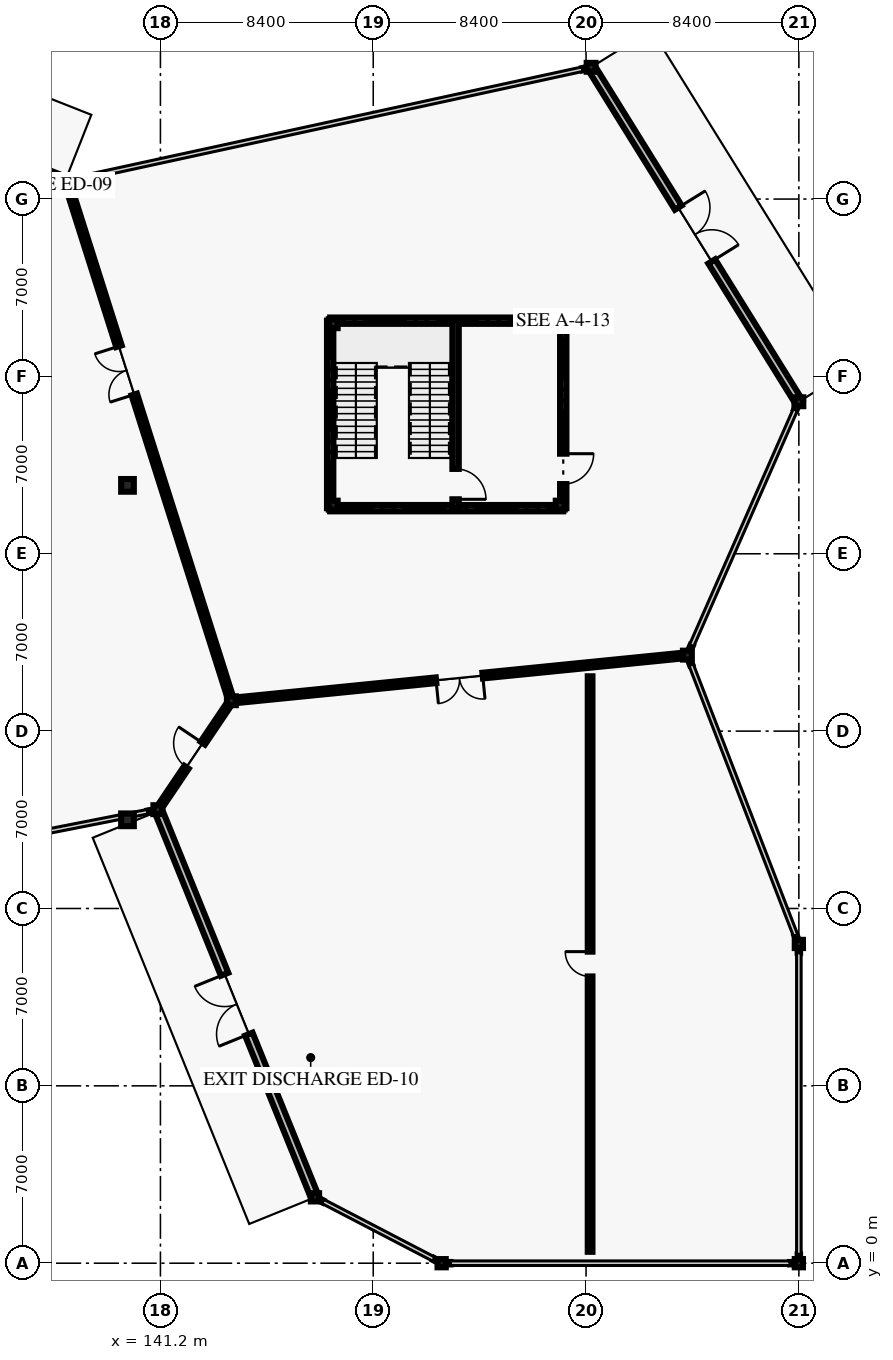
"""IFC4 building model, lengths in metres.
Left out: names, types, materials, properties, quantities, classifications, styles, units other than length and angle.
Written with IfcOpenShell. Run it as: python <this file> out.ifc"""

import sys

from ifc_helpers import new_model, si_unit, direction, frame, frame_2d, origin, origin_2d, place, context, subcontext, project, spatial, rectangle, hollow_circle, i_section, extrude, element, fill, save


model = new_model("IFC4")
c1 = context("Model", 3, precision=1e-05, world=origin(), true_north=direction((0.0, 1.0)))
c2 = subcontext(c1, "Body", "Model", "MODEL_VIEW")
j1 = project(units=[si_unit("LENGTHUNIT", "METRE"), si_unit("PLANEANGLEUNIT", "RADIAN")], contexts=[c1])
p1 = place(None, origin())
s1 = spatial("IfcSite", under=j1, at=p1, CompositionType="ELEMENT")
p2 = place(p1, origin())
s2 = spatial("IfcBuilding", under=s1, at=p2, CompositionType="ELEMENT")
p3 = place(p2, origin())
s3 = spatial("IfcBuildingStorey", under=s2, at=p3, CompositionType="ELEMENT", Elevation=0.0)
for number, where, z_axis, x_axis in (
    (1, (137.5, 42.7, 0.0), (0.0, 0.0, 1.0), (1.0, 0.0, 0.0)),
    (2, (141.1, 17.9, 0.0), (0.0, 0.0, 1.0), (1.0, 0.0, 0.0)),
    (3, (144.0, 22.2, 0.0), (0.0, 0.0, 1.0), (1.0, 0.0, 0.0)),
):
    element("IfcColumn", number, at=place(p3, frame(where, z_axis=z_axis, x_axis=x_axis)), inside=s3, PredefinedType="COLUMN", context=c2, shape_type="SweptSolid", body=[
        extrude(i_section(OverallWidth=0.35, OverallDepth=0.35, WebThickness=0.02, FlangeThickness=0.028, at=origin_2d()), origin(), (0.0, 0.0, 1.0), 5.4),
    ])
for number, where, z_axis, x_axis in (
    (4, (147.3, 2.6, 0.0), (0.0, 0.0, 1.0), (1.0, 0.0, 0.0)),
    (5, (152.3, 0.0, 0.0), (0.0, 0.0, 1.0), (1.0, 0.0, 0.0)),
):
    element("IfcColumn", number, at=place(p3, frame(where, z_axis=z_axis, x_axis=x_axis)), inside=s3, PredefinedType="COLUMN", context=c2, shape_type="SweptSolid", body=[
        extrude(hollow_circle(Radius=0.162, WallThickness=0.01, at=origin_2d()), origin(), (0.0, 0.0, 1.0), 5.4),
    ])
for number, where, z_axis, x_axis in (
    (6, (158.2, 47.2, 0.0), (0.0, 0.0, 1.0), (1.0, 0.0, 0.0)),
    (7, (162.0, 24.0, 0.0), (0.0, 0.0, 1.0), (1.0, 0.0, 0.0)),
):
    element("IfcColumn", number, at=place(p3, frame(where, z_axis=z_axis, x_axis=x_axis)), inside=s3, PredefinedType="COLUMN", context=c2, shape_type="SweptSolid", body=[
        extrude(i_section(OverallWidth=0.35, OverallDepth=0.35, WebThickness=0.02, FlangeThickness=0.028, at=origin_2d()), origin(), (0.0, 0.0, 1.0), 5.4),
    ])
for number, where, z_axis, x_axis in (
    (8, (166.4, 0.0, 0.0), (0.0, 0.0, 1.0), (1.0, 0.0, 0.0)),
    (9, (166.4, 12.6, 0.0), (0.0, 0.0, 1.0), (1.0, 0.0, 0.0)),
):
    element("IfcColumn", number, at=place(p3, frame(where, z_axis=z_axis, x_axis=x_axis)), inside=s3, PredefinedType="COLUMN", context=c2, shape_type="SweptSolid", body=[
        extrude(hollow_circle(Radius=0.162, WallThickness=0.01, at=origin_2d()), origin(), (0.0, 0.0, 1.0), 5.4),
    ])
p4 = place(p3, frame((166.4, 34.0, 0.0), z_axis=(0.0, 0.0, 1.0), x_axis=(1.0, 0.0, 0.0)))
e10 = element("IfcColumn", 10, at=p4, inside=s3, PredefinedType="COLUMN", context=c2, shape_type="SweptSolid", body=[
    extrude(i_section(OverallWidth=0.35, OverallDepth=0.35, WebThickness=0.02, FlangeThickness=0.028, at=origin_2d()), origin(), (0.0, 0.0, 1.0), 5.4),
])
for number, where, z_axis, x_axis in (
    (11, (139.9, 17.5, 0.0), (0.0, 0.0, 1.0), (1.0, 0.0, 0.0)),
    (12, (139.9, 30.7, 0.0), (0.0, 0.0, 1.0), (1.0, 0.0, 0.0)),
):
    element("IfcColumn", number, at=place(p3, frame(where, z_axis=z_axis, x_axis=x_axis)), inside=s3, PredefinedType="COLUMN", context=c2, shape_type="SweptSolid", body=[
        extrude(i_section(OverallWidth=0.5, OverallDepth=0.5, WebThickness=0.022, FlangeThickness=0.036, at=origin_2d()), origin(), (0.0, 0.0, 1.0), 5.4),
    ])
for number, where, z_axis, x_axis in (
    (13, (148.02, 29.92, 0.0), (0.0, 0.0, 1.0), (1.0, 0.0, 0.0)),
    (14, (156.98, 29.92, 0.0), (0.0, 0.0, 1.0), (1.0, 0.0, 0.0)),
    (15, (156.98, 37.08, 0.0), (0.0, 0.0, 1.0), (1.0, 0.0, 0.0)),
    (16, (148.02, 37.08, 0.0), (0.0, 0.0, 1.0), (1.0, 0.0, 0.0)),
):
    element("IfcColumn", number, at=place(p3, frame(where, z_axis=z_axis, x_axis=x_axis)), inside=s3, PredefinedType="COLUMN", context=c2, shape_type="SweptSolid", body=[
        extrude(i_section(OverallWidth=0.35, OverallDepth=0.35, WebThickness=0.02, FlangeThickness=0.028, at=origin_2d()), origin(), (0.0, 0.0, 1.0), 5.4),
    ])
p5 = place(p3, frame((125.657, 47.378, 0.0), z_axis=(0.0, 0.0, 1.0), x_axis=(0.930068974863, -0.367384950696, 0.0)))
e17 = element("IfcWall", 17, at=p5, inside=s3, PredefinedType="SOLIDWALL", context=c2, shape_type="SweptSolid", body=[
    extrude(rectangle(XDim=12.673, YDim=0.315, at=frame_2d((6.337, 0.0))), origin(), (0.0, 0.0, 1.0), 4.22),
])
p6 = place(p5, frame((5.087, 0.0, 0.0)))
e18 = element("IfcOpeningElement", 18, at=p6, cuts=e17, PredefinedType="OPENING", context=c2, shape_type="SweptSolid", body=[
    extrude(rectangle(XDim=2.5, YDim=2.45, at=frame_2d((1.25, 1.225))), frame((0.0, 0.167, 0.0), z_axis=(0.0, -1.0, 0.0), x_axis=(1.0, 0.0, 0.0)), (0.0, 0.0, 1.0), 0.335),
])
p7 = place(p3, frame((141.0, 17.88, 0.0), z_axis=(0.0, 0.0, 1.0), x_axis=(-0.981545118721, -0.19123069815, 0.0)))
e19 = element("IfcWall", 19, at=p7, inside=s3, PredefinedType="SOLIDWALL", context=c2, shape_type="SweptSolid", body=[
    extrude(rectangle(XDim=0.308, YDim=0.095, at=frame_2d((0.154, 0.0))), origin(), (0.0, 0.0, 1.0), 4.22),
])
p8 = place(p3, frame((147.3, 2.6, 0.0), z_axis=(0.0, 0.0, 1.0), x_axis=(-0.375550747937, 0.92680183196, 0.0)))
e20 = element("IfcWall", 20, at=p8, inside=s3, PredefinedType="SOLIDWALL", context=c2, shape_type="SweptSolid", body=[
    extrude(rectangle(XDim=16.448, YDim=0.315, at=frame_2d((8.224, 0.0))), origin(), (0.0, 0.0, 1.0), 4.22),
])
p9 = place(p8, frame((6.949, 0.0, 0.0)))
e21 = element("IfcOpeningElement", 21, at=p9, cuts=e20, PredefinedType="OPENING", context=c2, shape_type="SweptSolid", body=[
    extrude(rectangle(XDim=2.55, YDim=2.5, at=frame_2d((1.275, 1.25))), frame((0.0, 0.167, 0.0), z_axis=(0.0, -1.0, 0.0), x_axis=(1.0, 0.0, 0.0)), (0.0, 0.0, 1.0), 0.335),
])
p10 = place(p3, frame((152.263, 0.019, 0.0), z_axis=(0.0, 0.0, 1.0), x_axis=(-0.888005951379, 0.45983195878, 0.0)))
e22 = element("IfcWall", 22, at=p10, inside=s3, PredefinedType="SOLIDWALL", context=c2, shape_type="SweptSolid", body=[
    extrude(rectangle(XDim=0.309, YDim=0.095, at=frame_2d((0.154, 0.0))), origin(), (0.0, 0.0, 1.0), 4.22),
])
p11 = place(p3, frame((147.611, 2.439, 0.0), z_axis=(0.0, 0.0, 1.0), x_axis=(-0.887850239649, 0.460132537378, 0.0)))
e23 = element("IfcWall", 23, at=p11, inside=s3, PredefinedType="SOLIDWALL", context=c2, shape_type="SweptSolid", body=[
    extrude(rectangle(XDim=0.309, YDim=0.095, at=frame_2d((0.154, 0.0))), origin(), (0.0, 0.0, 1.0), 4.22),
])
for number, where, z_axis, x_axis in (
    (24, (166.358, 0.0, 0.0), (0.0, 0.0, 1.0), (-1.0, 0.0, 0.0)),
    (25, (152.65, 0.0, 0.0), (0.0, 0.0, 1.0), (-1.0, 0.0, 0.0)),
):
    element("IfcWall", number, at=place(p3, frame(where, z_axis=z_axis, x_axis=x_axis)), inside=s3, PredefinedType="SOLIDWALL", context=c2, shape_type="SweptSolid", body=[
        extrude(rectangle(XDim=0.308, YDim=0.095, at=frame_2d((0.154, 0.0))), origin(), (0.0, 0.0, 1.0), 4.22),
    ])
for number, where, z_axis, x_axis in (
    (26, (166.4, 12.558, 0.0), (0.0, 0.0, 1.0), (0.0, -1.0, 0.0)),
    (27, (166.4, 0.35, 0.0), (0.0, 0.0, 1.0), (0.0, -1.0, 0.0)),
):
    element("IfcWall", number, at=place(p3, frame(where, z_axis=z_axis, x_axis=x_axis)), inside=s3, PredefinedType="SOLIDWALL", context=c2, shape_type="SweptSolid", body=[
        extrude(rectangle(XDim=0.308, YDim=0.095, at=frame_2d((0.154, 0.0))), origin(), (0.0, 0.0, 1.0), 4.22),
    ])
p12 = place(p3, frame((162.037, 23.905, 0.0), z_axis=(0.0, 0.0, 1.0), x_axis=(0.359085078765, -0.933304830271, 0.0)))
e28 = element("IfcWall", 28, at=p12, inside=s3, PredefinedType="SOLIDWALL", context=c2, shape_type="SweptSolid", body=[
    extrude(rectangle(XDim=0.309, YDim=0.095, at=frame_2d((0.154, 0.0))), origin(), (0.0, 0.0, 1.0), 4.22),
])
p13 = place(p3, frame((166.274, 12.927, 0.0), z_axis=(0.0, 0.0, 1.0), x_axis=(0.359773736497, -0.933039580365, 0.0)))
e29 = element("IfcWall", 29, at=p13, inside=s3, PredefinedType="SOLIDWALL", context=c2, shape_type="SweptSolid", body=[
    extrude(rectangle(XDim=0.309, YDim=0.095, at=frame_2d((0.154, 0.0))), origin(), (0.0, 0.0, 1.0), 4.22),
])
for number, where, z_axis, x_axis in (
    (30, (166.383, 33.962, 0.0), (0.0, 0.0, 1.0), (-0.403, -0.915, 0.0)),
    (31, (162.165, 24.375, 0.0), (0.0, 0.0, 1.0), (-0.403, -0.915, 0.0)),
):
    element("IfcWall", number, at=place(p3, frame(where, z_axis=z_axis, x_axis=x_axis)), inside=s3, PredefinedType="SOLIDWALL", context=c2, shape_type="SweptSolid", body=[
        extrude(rectangle(XDim=0.308, YDim=0.095, at=frame_2d((0.154, 0.0))), origin(), (0.0, 0.0, 1.0), 4.22),
    ])
p14 = place(p3, frame((158.2, 47.2, 0.0), z_axis=(0.0, 0.0, 1.0), x_axis=(0.527682342596, -0.849441784534, 0.0)))
e32 = element("IfcWall", 32, at=p14, inside=s3, PredefinedType="SOLIDWALL", context=c2, shape_type="SweptSolid", body=[
    extrude(rectangle(XDim=15.54, YDim=0.315, at=frame_2d((7.77, 0.0))), origin(), (0.0, 0.0, 1.0), 4.22),
])
p15 = place(p14, frame((6.52, 0.0, 0.0)))
e33 = element("IfcOpeningElement", 33, at=p15, cuts=e32, PredefinedType="OPENING", context=c2, shape_type="SweptSolid", body=[
    extrude(rectangle(XDim=2.5, YDim=2.45, at=frame_2d((1.25, 1.225))), frame((0.0, 0.167, 0.0), z_axis=(0.0, -1.0, 0.0), x_axis=(1.0, 0.0, 0.0)), (0.0, 0.0, 1.0), 0.335),
])
for number, where, z_axis, x_axis in (
    (34, (137.6, 42.722, 0.0), (0.0, 0.0, 1.0), (0.977, 0.212, 0.0)),
    (35, (157.858, 47.126, 0.0), (0.0, 0.0, 1.0), (0.978, 0.211, 0.0)),
):
    element("IfcWall", number, at=place(p3, frame(where, z_axis=z_axis, x_axis=x_axis)), inside=s3, PredefinedType="SOLIDWALL", context=c2, shape_type="SweptSolid", body=[
        extrude(rectangle(XDim=0.308, YDim=0.095, at=frame_2d((0.154, 0.0))), origin(), (0.0, 0.0, 1.0), 4.22),
    ])
p16 = place(p3, frame((141.1, 17.9, 0.0), z_axis=(0.0, 0.0, 1.0), x_axis=(0.559124361662, 0.829083800467, 0.0)))
e36 = element("IfcWall", 36, at=p16, inside=s3, PredefinedType="SOLIDWALL", context=c2, shape_type="SweptSolid", body=[
    extrude(rectangle(XDim=5.187, YDim=0.205, at=frame_2d((2.593, 0.0))), origin(), (0.0, 0.0, 1.0), 3.92),
])
p17 = place(p16, frame((2.018, 0.0, 0.0)))
e37 = element("IfcOpeningElement", 37, at=p17, cuts=e36, PredefinedType="OPENING", context=c2, shape_type="SweptSolid", body=[
    extrude(rectangle(XDim=1.15, YDim=2.2, at=frame_2d((0.575, 1.1))), frame((0.0, 0.113, 0.0), z_axis=(0.0, -1.0, 0.0), x_axis=(1.0, 0.0, 0.0)), (0.0, 0.0, 1.0), 0.225),
])
p18 = place(p3, frame((144.0, 22.2, 0.0), z_axis=(0.0, 0.0, 1.0), x_axis=(-0.302243860734, 0.953230637699, 0.0)))
e38 = element("IfcWall", 38, at=p18, inside=s3, PredefinedType="SOLIDWALL", context=c2, shape_type="SweptSolid", body=[
    extrude(rectangle(XDim=21.506, YDim=0.225, at=frame_2d((10.753, 0.0))), origin(), (0.0, 0.0, 1.0), 4.62),
])
p19 = place(p18, frame((12.679, 0.0, 0.0)))
e39 = element("IfcOpeningElement", 39, at=p19, cuts=e38, PredefinedType="OPENING", context=c2, shape_type="SweptSolid", body=[
    extrude(rectangle(XDim=2.0, YDim=2.5, at=frame_2d((1.0, 1.25))), frame((0.0, 0.123, 0.0), z_axis=(0.0, -1.0, 0.0), x_axis=(1.0, 0.0, 0.0)), (0.0, 0.0, 1.0), 0.245),
])
p20 = place(p3, frame((162.0, 24.0, 0.0), z_axis=(0.0, 0.0, 1.0), x_axis=(-0.995036922958, -0.099506391506, 0.0)))
e40 = element("IfcWall", 40, at=p20, inside=s3, PredefinedType="SOLIDWALL", context=c2, shape_type="SweptSolid", body=[
    extrude(rectangle(XDim=18.09, YDim=0.225, at=frame_2d((9.045, 0.0))), origin(), (0.0, 0.0, 1.0), 4.62),
])
p21 = place(p20, frame((8.12, 0.0, 0.0)))
e41 = element("IfcOpeningElement", 41, at=p21, cuts=e40, PredefinedType="OPENING", context=c2, shape_type="SweptSolid", body=[
    extrude(rectangle(XDim=1.85, YDim=2.4, at=frame_2d((0.925, 1.2))), frame((0.0, 0.123, 0.0), z_axis=(0.0, -1.0, 0.0), x_axis=(1.0, 0.0, 0.0)), (0.0, 0.0, 1.0), 0.245),
])
p22 = place(p3, frame((158.16, 0.45, 0.0), z_axis=(0.0, 0.0, 1.0), x_axis=(0.0, 1.0, 0.0)))
e42 = element("IfcWall", 42, at=p22, inside=s3, PredefinedType="PARTITIONING", context=c2, shape_type="SweptSolid", body=[
    extrude(rectangle(XDim=22.714, YDim=0.185, at=frame_2d((11.357, 0.0))), origin(), (0.0, 0.0, 1.0), 3.92),
])
p23 = place(p22, frame((10.867, 0.0, 0.0)))
e43 = element("IfcOpeningElement", 43, at=p23, cuts=e42, PredefinedType="OPENING", context=c2, shape_type="SweptSolid", body=[
    extrude(rectangle(XDim=0.98, YDim=2.15, at=frame_2d((0.49, 1.075))), frame((0.0, 0.103, 0.0), z_axis=(0.0, -1.0, 0.0), x_axis=(1.0, 0.0, 0.0)), (0.0, 0.0, 1.0), 0.205),
])
p24 = place(p3, frame((147.9, 29.8, 0.0), z_axis=(0.0, 0.0, 1.0), x_axis=(0.0, 1.0, 0.0)))
e44 = element("IfcWall", 44, at=p24, inside=s3, PredefinedType="SHEAR", context=c2, shape_type="SweptSolid", body=[
    extrude(rectangle(XDim=7.4, YDim=0.25, at=frame_2d((3.7, 0.0))), origin(), (0.0, 0.0, 1.0), 5.16),
])
for number, where, z_axis, x_axis in (
    (45, (147.9, 37.2, 0.0), (0.0, 0.0, 1.0), (1.0, 0.0, 0.0)),
    (46, (157.1, 29.8, 0.0), (0.0, 0.0, 1.0), (-1.0, 0.0, 0.0)),
):
    element("IfcWall", number, at=place(p3, frame(where, z_axis=z_axis, x_axis=x_axis)), inside=s3, PredefinedType="SHEAR", context=c2, shape_type="SweptSolid", body=[
        extrude(rectangle(XDim=9.2, YDim=0.25, at=frame_2d((4.6, 0.0))), origin(), (0.0, 0.0, 1.0), 5.16),
    ])
p25 = place(p3, frame((157.1, 37.2, 0.0), z_axis=(0.0, 0.0, 1.0), x_axis=(0.0, -1.0, 0.0)))
e47 = element("IfcWall", 47, at=p25, inside=s3, PredefinedType="SHEAR", context=c2, shape_type="SweptSolid", body=[
    extrude(rectangle(XDim=7.4, YDim=0.25, at=frame_2d((3.7, 0.0))), origin(), (0.0, 0.0, 1.0), 5.16),
])
p26 = place(p25, frame((5.25, 0.0, 0.0)))
e48 = element("IfcOpeningElement", 48, at=p26, cuts=e47, PredefinedType="OPENING", context=c2, shape_type="SweptSolid", body=[
    extrude(rectangle(XDim=1.2, YDim=2.2, at=frame_2d((0.6, 1.1))), frame((0.0, 0.135, 0.0), z_axis=(0.0, -1.0, 0.0), x_axis=(1.0, 0.0, 0.0)), (0.0, 0.0, 1.0), 0.27),
])
p27 = place(p3, frame((152.85, 37.2, 0.0), z_axis=(0.0, 0.0, 1.0), x_axis=(0.0, -1.0, 0.0)))
e49 = element("IfcWall", 49, at=p27, inside=s3, PredefinedType="SHEAR", context=c2, shape_type="SweptSolid", body=[
    extrude(rectangle(XDim=7.4, YDim=0.25, at=frame_2d((3.7, 0.0))), origin(), (0.0, 0.0, 1.0), 5.16),
])
p28 = place(p27, frame((5.85, 0.0, 0.0)))
e50 = element("IfcOpeningElement", 50, at=p28, cuts=e49, PredefinedType="OPENING", context=c2, shape_type="SweptSolid", body=[
    extrude(rectangle(XDim=1.2, YDim=2.2, at=frame_2d((0.6, 1.1))), frame((0.0, 0.135, 0.0), z_axis=(0.0, -1.0, 0.0), x_axis=(1.0, 0.0, 0.0)), (0.0, 0.0, 1.0), 0.27),
])
p29 = place(p9, origin())
e51 = element("IfcDoor", 51, at=p29, inside=s3, OperationType="DOUBLE_DOOR_SINGLE_SWING", PredefinedType="DOOR", context=c2, shape_type="SweptSolid", body=[
    extrude(rectangle(XDim=2.55, YDim=2.5, at=frame_2d((1.275, 1.25))), frame((0.0, 0.025, 0.0), z_axis=(0.0, -1.0, 0.0), x_axis=(1.0, 0.0, 0.0)), (0.0, 0.0, 1.0), 0.05),
])
fill(e21, e51)
p30 = place(p15, origin())
e52 = element("IfcDoor", 52, at=p30, inside=s3, OperationType="DOUBLE_DOOR_SINGLE_SWING", PredefinedType="DOOR", context=c2, shape_type="SweptSolid", body=[
    extrude(rectangle(XDim=2.5, YDim=2.45, at=frame_2d((1.25, 1.225))), frame((0.0, 0.025, 0.0), z_axis=(0.0, -1.0, 0.0), x_axis=(1.0, 0.0, 0.0)), (0.0, 0.0, 1.0), 0.05),
])
fill(e33, e52)
p31 = place(p17, origin())
e53 = element("IfcDoor", 53, at=p31, inside=s3, OperationType="SINGLE_SWING_RIGHT", PredefinedType="DOOR", context=c2, shape_type="SweptSolid", body=[
    extrude(rectangle(XDim=1.15, YDim=2.2, at=frame_2d((0.575, 1.1))), frame((0.0, 0.025, 0.0), z_axis=(0.0, -1.0, 0.0), x_axis=(1.0, 0.0, 0.0)), (0.0, 0.0, 1.0), 0.05),
])
fill(e37, e53)
p32 = place(p19, origin())
e54 = element("IfcDoor", 54, at=p32, inside=s3, OperationType="DOUBLE_DOOR_SINGLE_SWING", PredefinedType="DOOR", context=c2, shape_type="SweptSolid", body=[
    extrude(rectangle(XDim=2.0, YDim=2.5, at=frame_2d((1.0, 1.25))), frame((0.0, 0.025, 0.0), z_axis=(0.0, -1.0, 0.0), x_axis=(1.0, 0.0, 0.0)), (0.0, 0.0, 1.0), 0.05),
])
fill(e39, e54)
p33 = place(p21, origin())
e55 = element("IfcDoor", 55, at=p33, inside=s3, OperationType="DOUBLE_DOOR_SINGLE_SWING", PredefinedType="DOOR", context=c2, shape_type="SweptSolid", body=[
    extrude(rectangle(XDim=1.85, YDim=2.4, at=frame_2d((0.925, 1.2))), frame((0.0, 0.025, 0.0), z_axis=(0.0, -1.0, 0.0), x_axis=(1.0, 0.0, 0.0)), (0.0, 0.0, 1.0), 0.05),
])
fill(e41, e55)
p34 = place(p23, origin())
e56 = element("IfcDoor", 56, at=p34, inside=s3, OperationType="SINGLE_SWING_RIGHT", PredefinedType="DOOR", context=c2, shape_type="SweptSolid", body=[
    extrude(rectangle(XDim=0.98, YDim=2.15, at=frame_2d((0.49, 1.075))), frame((0.0, 0.025, 0.0), z_axis=(0.0, -1.0, 0.0), x_axis=(1.0, 0.0, 0.0)), (0.0, 0.0, 1.0), 0.05),
])
fill(e43, e56)
p35 = place(p26, origin())
e57 = element("IfcDoor", 57, at=p35, inside=s3, OperationType="SINGLE_SWING_LEFT", PredefinedType="DOOR", context=c2, shape_type="SweptSolid", body=[
    extrude(rectangle(XDim=1.2, YDim=2.2, at=frame_2d((0.6, 1.1))), frame((0.0, 0.025, 0.0), z_axis=(0.0, -1.0, 0.0), x_axis=(1.0, 0.0, 0.0)), (0.0, 0.0, 1.0), 0.05),
])
fill(e48, e57)
p36 = place(p28, origin())
e58 = element("IfcDoor", 58, at=p36, inside=s3, OperationType="SINGLE_SWING_RIGHT", PredefinedType="DOOR", context=c2, shape_type="SweptSolid", body=[
    extrude(rectangle(XDim=1.2, YDim=2.2, at=frame_2d((0.6, 1.1))), frame((0.0, 0.025, 0.0), z_axis=(0.0, -1.0, 0.0), x_axis=(1.0, 0.0, 0.0)), (0.0, 0.0, 1.0), 0.05),
])
fill(e50, e58)
save(model, sys.argv[1])
